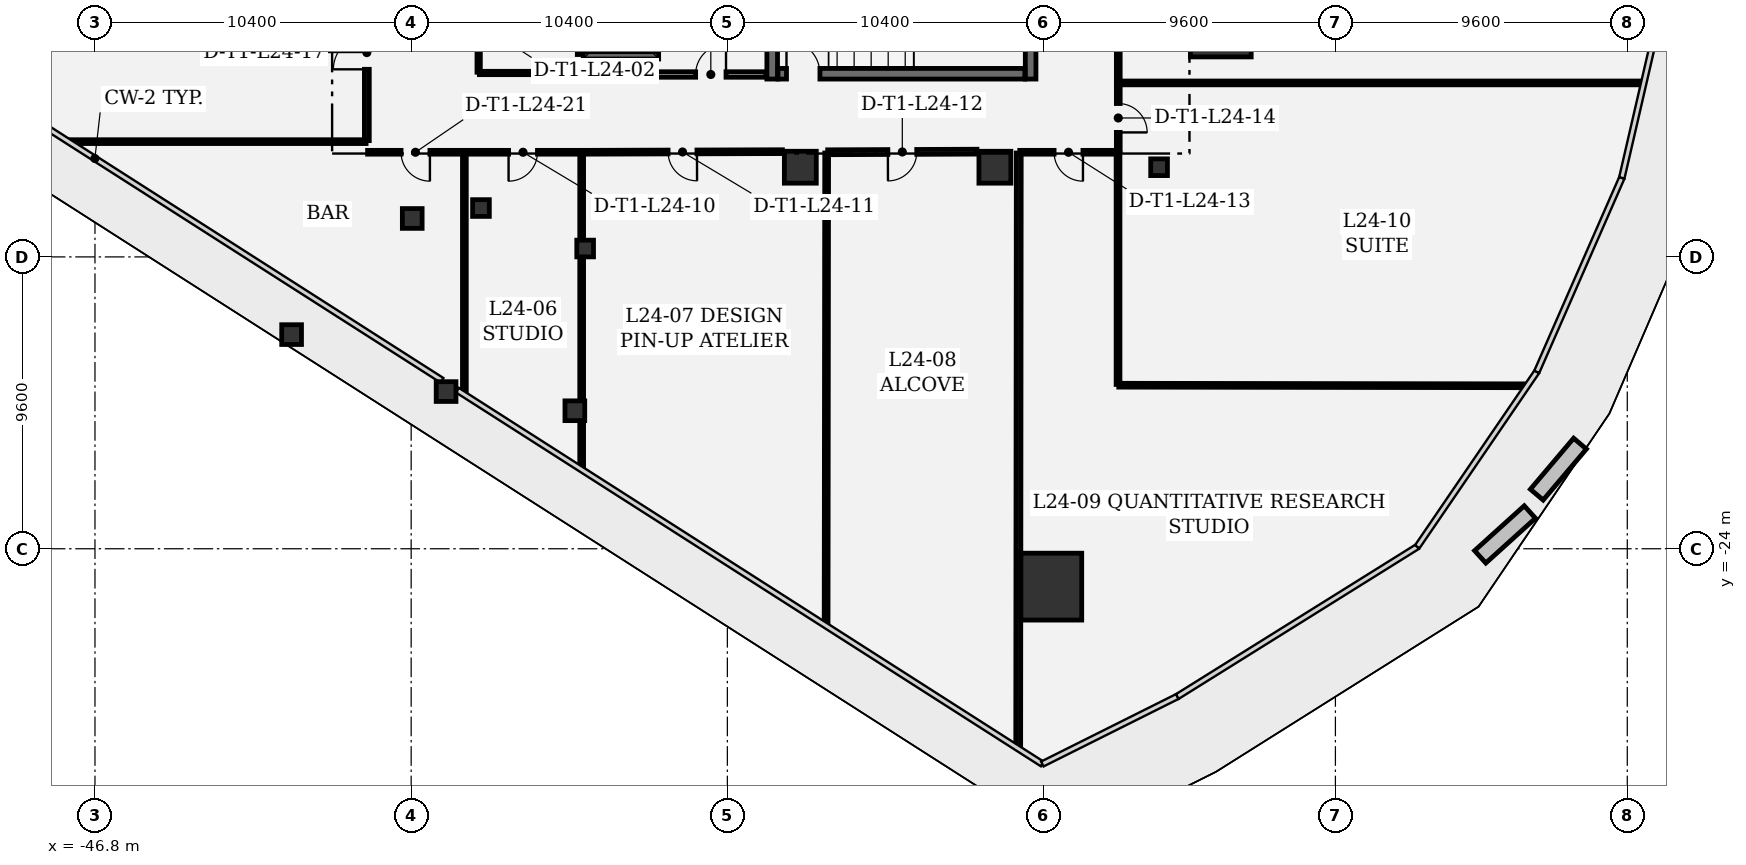
"""IFC4 building model, lengths in metres.
Left out: names, types, materials, properties, quantities, classifications, styles, units other than length and angle.
Written with IfcOpenShell. Run it as: python <this file> out.ifc"""

import sys

from ifc_helpers import new_model, si_unit, direction, frame, frame_2d, origin, origin_2d, place, context, subcontext, project, spatial, rectangle, extrude, element, fill, save


model = new_model("IFC4")
c1 = context("Model", 3, precision=1e-05, world=origin(), true_north=direction((0.0, 1.0)))
c2 = subcontext(c1, "Body", "Model", "MODEL_VIEW")
j1 = project(units=[si_unit("LENGTHUNIT", "METRE"), si_unit("PLANEANGLEUNIT", "RADIAN")], contexts=[c1])
p1 = place(None, origin())
s1 = spatial("IfcSite", under=j1, at=p1, CompositionType="ELEMENT")
p2 = place(p1, origin())
s2 = spatial("IfcBuilding", under=s1, at=p2, CompositionType="ELEMENT")
p3 = place(p2, frame((0.0, 0.0, 109.8)))
s3 = spatial("IfcBuildingStorey", under=s2, at=p3, CompositionType="ELEMENT", Elevation=109.8)
for number, where, z_axis, x_axis in (
    (1, (-15.344, -25.246, 0.0), (0.0, 0.0, 1.0), (1.0, 0.0, 0.0)),
    (2, (-9.77, -6.721, 0.0), (0.0, 0.0, 1.0), (1.0, 0.0, 0.0)),
):
    element("IfcColumn", number, at=place(p3, frame(where, z_axis=z_axis, x_axis=x_axis)), inside=s3, PredefinedType="COLUMN", context=c2, shape_type="SweptSolid", body=[
        extrude(rectangle(XDim=2.0, YDim=2.2, at=origin_2d()), origin(), (0.0, 0.0, 1.0), 4.05),
    ])
for number, where, z_axis, x_axis in (
    (3, (-17.2, -11.45, 0.0), (0.0, 0.0, 1.0), (1.0, 0.0, 0.0)),
    (4, (-23.6, -11.45, 0.0), (0.0, 0.0, 1.0), (1.0, 0.0, 0.0)),
):
    element("IfcColumn", number, at=place(p3, frame(where, z_axis=z_axis, x_axis=x_axis)), inside=s3, PredefinedType="COLUMN", context=c2, shape_type="SweptSolid", body=[
        extrude(rectangle(XDim=1.05, YDim=1.05, at=origin_2d()), origin(), (0.0, 0.0, 1.0), 4.05),
    ])
for number, where, z_axis, x_axis in (
    (5, (-40.333, -16.956, 0.0), (0.0, 0.0, 1.0), (1.0, 0.0, 0.0)),
    (6, (-35.252, -18.829, 0.0), (0.0, 0.0, 1.0), (1.0, 0.0, 0.0)),
    (7, (-31.016, -19.46, 0.0), (0.0, 0.0, 1.0), (1.0, 0.0, 0.0)),
    (8, (-36.365, -13.135, 0.0), (0.0, 0.0, 1.0), (1.0, 0.0, 0.0)),
):
    element("IfcColumn", number, at=place(p3, frame(where, z_axis=z_axis, x_axis=x_axis)), inside=s3, PredefinedType="COLUMN", context=c2, shape_type="SweptSolid", body=[
        extrude(rectangle(XDim=0.65, YDim=0.65, at=origin_2d()), origin(), (0.0, 0.0, 1.0), 4.05),
    ])
for number, where, z_axis, x_axis in (
    (9, (-34.104, -12.792, 0.0), (0.0, 0.0, 1.0), (1.0, 0.0, 0.0)),
    (10, (-30.677, -14.124, 0.0), (0.0, 0.0, 1.0), (1.0, 0.0, 0.0)),
    (11, (-11.8, -11.45, 0.0), (0.0, 0.0, 1.0), (1.0, 0.0, 0.0)),
):
    element("IfcColumn", number, at=place(p3, frame(where, z_axis=z_axis, x_axis=x_axis)), inside=s3, PredefinedType="COLUMN", context=c2, shape_type="SweptSolid", body=[
        extrude(rectangle(XDim=0.55, YDim=0.55, at=origin_2d()), origin(), (0.0, 0.0, 1.0), 4.05),
    ])
p4 = place(p3, frame((-24.525, -4.34, 0.0), z_axis=(0.0, 0.0, 1.0), x_axis=(0.0, -1.0, 0.0)))
e12 = element("IfcWall", 12, at=p4, inside=s3, PredefinedType="SHEAR", context=c2, shape_type="SweptSolid", body=[
    extrude(rectangle(XDim=4.21, YDim=0.35, at=frame_2d((2.105, 0.0))), origin(), (0.0, 0.0, 1.0), 3.77),
])
p5 = place(p3, frame((-16.025, -8.55, 0.0), z_axis=(0.0, 0.0, 1.0), x_axis=(0.0, 1.0, 0.0)))
e13 = element("IfcWall", 13, at=p5, inside=s3, PredefinedType="SHEAR", context=c2, shape_type="SweptSolid", body=[
    extrude(rectangle(XDim=4.61, YDim=0.35, at=frame_2d((2.305, 0.0))), origin(), (0.0, 0.0, 1.0), 3.77),
])
p6 = place(p3, frame((-24.335, -8.375, 0.0), z_axis=(0.0, 0.0, 1.0), x_axis=(1.0, 0.0, 0.0)))
e14 = element("IfcWall", 14, at=p6, inside=s3, PredefinedType="SHEAR", context=c2, shape_type="SweptSolid", body=[
    extrude(rectangle(XDim=8.12, YDim=0.35, at=frame_2d((4.06, 0.0))), origin(), (0.0, 0.0, 1.0), 3.77),
])
p7 = place(p6, frame((0.28, 0.0, 0.0)))
e15 = element("IfcOpeningElement", 15, at=p7, cuts=e14, PredefinedType="OPENING", context=c2, shape_type="SweptSolid", body=[
    extrude(rectangle(XDim=1.1, YDim=2.2, at=frame_2d((0.55, 1.1))), frame((0.0, 0.185, 0.0), z_axis=(0.0, -1.0, 0.0), x_axis=(1.0, 0.0, 0.0)), (0.0, 0.0, 1.0), 0.37),
])
p8 = place(p3, frame((-28.26, -7.77, 0.0), z_axis=(0.0, 0.0, 1.0), x_axis=(-1.0, 0.0, 0.0)))
e16 = element("IfcWall", 16, at=p8, inside=s3, PredefinedType="SHEAR", context=c2, shape_type="SweptSolid", body=[
    extrude(rectangle(XDim=2.48, YDim=0.24, at=frame_2d((1.24, 0.0))), origin(), (0.0, 0.0, 1.0), 3.77),
])
p9 = place(p3, frame((-28.355, -8.4, 0.0), z_axis=(0.0, 0.0, 1.0), x_axis=(1.0, 0.0, 0.0)))
e17 = element("IfcWall", 17, at=p9, inside=s3, PredefinedType="PARTITIONING", context=c2, shape_type="SweptSolid", body=[
    extrude(rectangle(XDim=3.622, YDim=0.18, at=frame_2d((1.811, 0.0))), origin(), (0.0, 0.0, 1.0), 3.77),
])
p10 = place(p9, frame((1.311, 0.0, 0.0)))
e18 = element("IfcOpeningElement", 18, at=p10, cuts=e17, PredefinedType="OPENING", context=c2, shape_type="SweptSolid", body=[
    extrude(rectangle(XDim=1.0, YDim=2.15, at=frame_2d((0.5, 1.075))), frame((0.0, 0.1, 0.0), z_axis=(0.0, -1.0, 0.0), x_axis=(1.0, 0.0, 0.0)), (0.0, 0.0, 1.0), 0.2),
])
p11 = place(p3, frame((-34.155, -8.35, 0.0), z_axis=(0.0, 0.0, 1.0), x_axis=(1.0, 0.0, 0.0)))
e19 = element("IfcWall", 19, at=p11, inside=s3, PredefinedType="PARTITIONING", context=c2, shape_type="SweptSolid", body=[
    extrude(rectangle(XDim=3.25, YDim=0.11, at=frame_2d((1.625, 0.0))), origin(), (0.0, 0.0, 1.0), 3.77),
])
p12 = place(p3, frame((-30.88, -7.743, 0.0), z_axis=(0.0, 0.0, 1.0), x_axis=(0.0, 1.0, 0.0)))
e20 = element("IfcWall", 20, at=p12, inside=s3, PredefinedType="PARTITIONING", context=c2, shape_type="SweptSolid", body=[
    extrude(rectangle(XDim=2.003, YDim=0.11, at=frame_2d((1.001, 0.0))), origin(), (0.0, 0.0, 1.0), 3.77),
])
p13 = place(p3, frame((-34.18, -5.075, 0.0), z_axis=(0.0, 0.0, 1.0), x_axis=(0.0, -1.0, 0.0)))
e21 = element("IfcWall", 21, at=p13, inside=s3, PredefinedType="PARTITIONING", context=c2, shape_type="SweptSolid", body=[
    extrude(rectangle(XDim=3.25, YDim=0.11, at=frame_2d((1.625, 0.0))), origin(), (0.0, 0.0, 1.0), 3.77),
])
p14 = place(p13, frame((1.185, 0.0, 0.0)))
e22 = element("IfcOpeningElement", 22, at=p14, cuts=e21, PredefinedType="OPENING", context=c2, shape_type="SweptSolid", body=[
    extrude(rectangle(XDim=0.88, YDim=2.1, at=frame_2d((0.44, 1.05))), frame((0.0, 0.065, 0.0), z_axis=(0.0, -1.0, 0.0), x_axis=(1.0, 0.0, 0.0)), (0.0, 0.0, 1.0), 0.13),
])
p15 = place(p3, frame((-30.817, -10.958, 0.0), z_axis=(0.0, 0.0, 1.0), x_axis=(-1.0, 0.0, 0.0)))
e23 = element("IfcWall", 23, at=p15, inside=s3, PredefinedType="PARTITIONING", context=c2, shape_type="SweptSolid", body=[
    extrude(rectangle(XDim=3.808, YDim=0.125, at=frame_2d((1.904, 0.0))), origin(), (0.0, 0.0, 1.0), 3.77),
])
p16 = place(p15, frame((1.429, 0.0, 0.0)))
e24 = element("IfcOpeningElement", 24, at=p16, cuts=e23, PredefinedType="OPENING", context=c2, shape_type="SweptSolid", body=[
    extrude(rectangle(XDim=0.95, YDim=2.15, at=frame_2d((0.475, 1.075))), frame((0.0, 0.073, 0.0), z_axis=(0.0, -1.0, 0.0), x_axis=(1.0, 0.0, 0.0)), (0.0, 0.0, 1.0), 0.145),
])
p17 = place(p3, frame((-34.65, -10.983, 0.0), z_axis=(0.0, 0.0, 1.0), x_axis=(0.0, -1.0, 0.0)))
e25 = element("IfcWall", 25, at=p17, inside=s3, PredefinedType="PARTITIONING", context=c2, shape_type="SweptSolid", body=[
    extrude(rectangle(XDim=7.868, YDim=0.125, at=frame_2d((3.934, 0.0))), origin(), (0.0, 0.0, 1.0), 3.77),
])
p18 = place(p3, frame((-30.792, -21.316, 0.0), z_axis=(0.0, 0.0, 1.0), x_axis=(0.0, 1.0, 0.0)))
e26 = element("IfcWall", 26, at=p18, inside=s3, PredefinedType="PARTITIONING", context=c2, shape_type="SweptSolid", body=[
    extrude(rectangle(XDim=1.466, YDim=0.125, at=frame_2d((0.733, 0.0))), origin(), (0.0, 0.0, 1.0), 3.77),
])
p19 = place(p3, frame((-30.792, -19.07, 0.0), z_axis=(0.0, 0.0, 1.0), x_axis=(0.0, 1.0, 0.0)))
e27 = element("IfcWall", 27, at=p19, inside=s3, PredefinedType="PARTITIONING", context=c2, shape_type="SweptSolid", body=[
    extrude(rectangle(XDim=4.606, YDim=0.125, at=frame_2d((2.303, 0.0))), origin(), (0.0, 0.0, 1.0), 3.77),
])
p20 = place(p3, frame((-30.792, -13.784, 0.0), z_axis=(0.0, 0.0, 1.0), x_axis=(0.0, 1.0, 0.0)))
e28 = element("IfcWall", 28, at=p20, inside=s3, PredefinedType="PARTITIONING", context=c2, shape_type="SweptSolid", body=[
    extrude(rectangle(XDim=2.801, YDim=0.125, at=frame_2d((1.401, 0.0))), origin(), (0.0, 0.0, 1.0), 3.77),
])
p21 = place(p3, frame((-24.19, -10.938, 0.0), z_axis=(0.0, 0.0, 1.0), x_axis=(-0.999995468533, -0.003010467292, 0.0)))
e29 = element("IfcWall", 29, at=p21, inside=s3, PredefinedType="PARTITIONING", context=c2, shape_type="SweptSolid", body=[
    extrude(rectangle(XDim=6.569, YDim=0.125, at=frame_2d((3.284, 0.0))), origin(), (0.0, 0.0, 1.0), 3.77),
])
p22 = place(p21, frame((2.81, 0.0, 0.0)))
e30 = element("IfcOpeningElement", 30, at=p22, cuts=e29, PredefinedType="OPENING", context=c2, shape_type="SweptSolid", body=[
    extrude(rectangle(XDim=0.95, YDim=2.15, at=frame_2d((0.475, 1.075))), frame((0.0, 0.073, 0.0), z_axis=(0.0, -1.0, 0.0), x_axis=(1.0, 0.0, 0.0)), (0.0, 0.0, 1.0), 0.145),
])
p23 = place(p3, frame((-22.752, -26.455, 0.0), z_axis=(0.0, 0.0, 1.0), x_axis=(0.001167688914, 0.999999318251, 0.0)))
e31 = element("IfcWall", 31, at=p23, inside=s3, PredefinedType="PARTITIONING", context=c2, shape_type="SweptSolid", body=[
    extrude(rectangle(XDim=15.472, YDim=0.125, at=frame_2d((7.736, 0.0))), origin(), (0.0, 0.0, 1.0), 2.885),
])
p24 = place(p3, frame((-17.79, -10.938, 0.0), z_axis=(0.0, 0.0, 1.0), x_axis=(-0.99999189155, -0.004027013186, 0.0)))
e32 = element("IfcWall", 32, at=p24, inside=s3, PredefinedType="PARTITIONING", context=c2, shape_type="SweptSolid", body=[
    extrude(rectangle(XDim=4.911, YDim=0.16, at=frame_2d((2.455, 0.0))), origin(), (0.0, 0.0, 1.0), 3.77),
])
p25 = place(p24, frame((1.98, 0.0, 0.0)))
e33 = element("IfcOpeningElement", 33, at=p25, cuts=e32, PredefinedType="OPENING", context=c2, shape_type="SweptSolid", body=[
    extrude(rectangle(XDim=0.95, YDim=2.15, at=frame_2d((0.475, 1.075))), frame((0.0, 0.09, 0.0), z_axis=(0.0, -1.0, 0.0), x_axis=(1.0, 0.0, 0.0)), (0.0, 0.0, 1.0), 0.18),
])
p26 = place(p3, frame((-16.433, -30.493, 0.0), z_axis=(0.0, 0.0, 1.0), x_axis=(0.000925983461, 0.999999571277, 0.0)))
e34 = element("IfcWall", 34, at=p26, inside=s3, PredefinedType="PARTITIONING", context=c2, shape_type="SweptSolid", body=[
    extrude(rectangle(XDim=19.51, YDim=0.16, at=frame_2d((9.755, 0.0))), origin(), (0.0, 0.0, 1.0), 2.885),
])
p27 = place(p3, frame((0.229, -18.639, 0.0), z_axis=(0.0, 0.0, 1.0), x_axis=(-0.999999034754, 0.001389420769, 0.0)))
e35 = element("IfcWall", 35, at=p27, inside=s3, PredefinedType="PARTITIONING", context=c2, shape_type="SweptSolid", body=[
    extrude(rectangle(XDim=13.354, YDim=0.125, at=frame_2d((6.677, 0.0))), origin(), (0.0, 0.0, 1.0), 3.77),
])
p28 = place(p3, frame((-13.15, -10.983, 0.0), z_axis=(0.0, 0.0, 1.0), x_axis=(0.0, -1.0, 0.0)))
e36 = element("IfcWall", 36, at=p28, inside=s3, PredefinedType="PARTITIONING", context=c2, shape_type="SweptSolid", body=[
    extrude(rectangle(XDim=7.613, YDim=0.125, at=frame_2d((3.806, 0.0))), origin(), (0.0, 0.0, 1.0), 2.89),
])
p29 = place(p3, frame((-13.175, -10.958, 0.0), z_axis=(0.0, 0.0, 1.0), x_axis=(-1.0, 0.0, 0.0)))
e37 = element("IfcWall", 37, at=p29, inside=s3, PredefinedType="PARTITIONING", context=c2, shape_type="SweptSolid", body=[
    extrude(rectangle(XDim=3.207, YDim=0.125, at=frame_2d((1.604, 0.0))), origin(), (0.0, 0.0, 1.0), 2.885),
])
p30 = place(p29, frame((1.129, 0.0, 0.0)))
e38 = element("IfcOpeningElement", 38, at=p30, cuts=e37, PredefinedType="OPENING", context=c2, shape_type="SweptSolid", body=[
    extrude(rectangle(XDim=0.95, YDim=2.15, at=frame_2d((0.475, 1.075))), frame((0.0, 0.073, 0.0), z_axis=(0.0, -1.0, 0.0), x_axis=(1.0, 0.0, 0.0)), (0.0, 0.0, 1.0), 0.145),
])
p31 = place(p3, frame((4.062, -8.677, 0.0), z_axis=(0.0, 0.0, 1.0), x_axis=(-1.0, 0.0, 0.0)))
e39 = element("IfcWall", 39, at=p31, inside=s3, PredefinedType="PARTITIONING", context=c2, shape_type="SweptSolid", body=[
    extrude(rectangle(XDim=17.179, YDim=0.125, at=frame_2d((8.59, 0.0))), origin(), (0.0, 0.0, 1.0), 2.885),
])
p32 = place(p3, frame((-13.142, -8.702, 0.0), z_axis=(0.0, 0.0, 1.0), x_axis=(0.0, -1.0, 0.0)))
e40 = element("IfcWall", 40, at=p32, inside=s3, PredefinedType="PARTITIONING", context=c2, shape_type="SweptSolid", body=[
    extrude(rectangle(XDim=2.256, YDim=0.125, at=frame_2d((1.128, 0.0))), origin(), (0.0, 0.0, 1.0), 3.77),
])
p33 = place(p32, frame((0.653, 0.0, 0.0)))
e41 = element("IfcOpeningElement", 41, at=p33, cuts=e40, PredefinedType="OPENING", context=c2, shape_type="SweptSolid", body=[
    extrude(rectangle(XDim=0.95, YDim=2.15, at=frame_2d((0.475, 1.075))), frame((0.0, 0.073, 0.0), z_axis=(0.0, -1.0, 0.0), x_axis=(1.0, 0.0, 0.0)), (0.0, 0.0, 1.0), 0.145),
])
p34 = place(p3, frame((-13.142, 2.878, 0.0), z_axis=(0.0, 0.0, 1.0), x_axis=(0.0, -1.0, 0.0)))
e42 = element("IfcWall", 42, at=p34, inside=s3, PredefinedType="PARTITIONING", context=c2, shape_type="SweptSolid", body=[
    extrude(rectangle(XDim=11.523, YDim=0.125, at=frame_2d((5.761, 0.0))), origin(), (0.0, 0.0, 1.0), 3.77),
])
p35 = place(p34, frame((5.286, 0.0, 0.0)))
e43 = element("IfcOpeningElement", 43, at=p35, cuts=e42, PredefinedType="OPENING", context=c2, shape_type="SweptSolid", body=[
    extrude(rectangle(XDim=0.95, YDim=2.15, at=frame_2d((0.475, 1.075))), frame((0.0, 0.073, 0.0), z_axis=(0.0, -1.0, 0.0), x_axis=(1.0, 0.0, 0.0)), (0.0, 0.0, 1.0), 0.145),
])
p36 = place(p3, frame((-34.683, -10.958, 0.0), z_axis=(0.0, 0.0, 1.0), x_axis=(-1.0, 0.0, 0.0)))
e44 = element("IfcWall", 44, at=p36, inside=s3, PredefinedType="PARTITIONING", context=c2, shape_type="SweptSolid", body=[
    extrude(rectangle(XDim=3.15, YDim=0.125, at=frame_2d((1.575, 0.0))), origin(), (0.0, 0.0, 1.0), 3.334),
])
p37 = place(p36, frame((1.1, 0.0, 0.0)))
e45 = element("IfcOpeningElement", 45, at=p37, cuts=e44, PredefinedType="OPENING", context=c2, shape_type="SweptSolid", body=[
    extrude(rectangle(XDim=0.95, YDim=2.15, at=frame_2d((0.475, 1.075))), frame((0.0, 0.073, 0.0), z_axis=(0.0, -1.0, 0.0), x_axis=(1.0, 0.0, 0.0)), (0.0, 0.0, 1.0), 0.145),
])
p38 = place(p3, frame((-37.883, -10.608, 0.0), z_axis=(0.0, 0.0, 1.0), x_axis=(-1.0, 0.0, 0.0)))
e46 = element("IfcWall", 46, at=p38, inside=s3, PredefinedType="PARTITIONING", context=c2, shape_type="SweptSolid", body=[
    extrude(rectangle(XDim=9.708, YDim=0.125, at=frame_2d((4.854, 0.0))), origin(), (0.0, 0.0, 1.0), 2.89),
])
p39 = place(p3, frame((-37.858, -10.576, 0.0), z_axis=(0.0, 0.0, 1.0), x_axis=(0.0, 1.0, 0.0)))
e47 = element("IfcWall", 47, at=p39, inside=s3, PredefinedType="PARTITIONING", context=c2, shape_type="SweptSolid", body=[
    extrude(rectangle(XDim=5.792, YDim=0.16, at=frame_2d((2.896, 0.0))), origin(), (0.0, 0.0, 1.0), 3.77),
])
p40 = place(p39, frame((2.346, 0.0, 0.0)))
e48 = element("IfcOpeningElement", 48, at=p40, cuts=e47, PredefinedType="OPENING", context=c2, shape_type="SweptSolid", body=[
    extrude(rectangle(XDim=1.1, YDim=2.15, at=frame_2d((0.55, 1.075))), frame((0.0, 0.09, 0.0), z_axis=(0.0, -1.0, 0.0), x_axis=(1.0, 0.0, 0.0)), (0.0, 0.0, 1.0), 0.18),
])
p41 = place(p7, origin())
e49 = element("IfcDoor", 49, at=p41, inside=s3, OperationType="SINGLE_SWING_LEFT", PredefinedType="DOOR", context=c2, shape_type="SweptSolid", body=[
    extrude(rectangle(XDim=1.1, YDim=2.2, at=frame_2d((0.55, 1.1))), frame((0.0, 0.025, 0.0), z_axis=(0.0, -1.0, 0.0), x_axis=(1.0, 0.0, 0.0)), (0.0, 0.0, 1.0), 0.05),
])
fill(e15, e49)
p42 = place(p16, origin())
e50 = element("IfcDoor", 50, at=p42, inside=s3, OperationType="SINGLE_SWING_RIGHT", PredefinedType="DOOR", context=c2, shape_type="SweptSolid", body=[
    extrude(rectangle(XDim=0.95, YDim=2.15, at=frame_2d((0.475, 1.075))), frame((0.0, 0.025, 0.0), z_axis=(0.0, -1.0, 0.0), x_axis=(1.0, 0.0, 0.0)), (0.0, 0.0, 1.0), 0.05),
])
fill(e24, e50)
p43 = place(p22, origin())
e51 = element("IfcDoor", 51, at=p43, inside=s3, OperationType="SINGLE_SWING_LEFT", PredefinedType="DOOR", context=c2, shape_type="SweptSolid", body=[
    extrude(rectangle(XDim=0.95, YDim=2.15, at=frame_2d((0.475, 1.075))), frame((0.0, 0.025, 0.0), z_axis=(0.0, -1.0, 0.0), x_axis=(1.0, 0.0, 0.0)), (0.0, 0.0, 1.0), 0.05),
])
fill(e30, e51)
p44 = place(p25, origin())
e52 = element("IfcDoor", 52, at=p44, inside=s3, OperationType="SINGLE_SWING_RIGHT", PredefinedType="DOOR", context=c2, shape_type="SweptSolid", body=[
    extrude(rectangle(XDim=0.95, YDim=2.15, at=frame_2d((0.475, 1.075))), frame((0.0, 0.025, 0.0), z_axis=(0.0, -1.0, 0.0), x_axis=(1.0, 0.0, 0.0)), (0.0, 0.0, 1.0), 0.05),
])
fill(e33, e52)
p45 = place(p30, origin())
e53 = element("IfcDoor", 53, at=p45, inside=s3, OperationType="SINGLE_SWING_LEFT", PredefinedType="DOOR", context=c2, shape_type="SweptSolid", body=[
    extrude(rectangle(XDim=0.95, YDim=2.15, at=frame_2d((0.475, 1.075))), frame((0.0, 0.025, 0.0), z_axis=(0.0, -1.0, 0.0), x_axis=(1.0, 0.0, 0.0)), (0.0, 0.0, 1.0), 0.05),
])
fill(e38, e53)
p46 = place(p33, origin())
e54 = element("IfcDoor", 54, at=p46, inside=s3, OperationType="SINGLE_SWING_RIGHT", PredefinedType="DOOR", context=c2, shape_type="SweptSolid", body=[
    extrude(rectangle(XDim=0.95, YDim=2.15, at=frame_2d((0.475, 1.075))), frame((0.0, 0.025, 0.0), z_axis=(0.0, -1.0, 0.0), x_axis=(1.0, 0.0, 0.0)), (0.0, 0.0, 1.0), 0.05),
])
fill(e41, e54)
p47 = place(p40, origin())
e55 = element("IfcDoor", 55, at=p47, inside=s3, OperationType="SINGLE_SWING_LEFT", PredefinedType="DOOR", context=c2, shape_type="SweptSolid", body=[
    extrude(rectangle(XDim=1.1, YDim=2.15, at=frame_2d((0.55, 1.075))), frame((0.0, 0.025, 0.0), z_axis=(0.0, -1.0, 0.0), x_axis=(1.0, 0.0, 0.0)), (0.0, 0.0, 1.0), 0.05),
])
fill(e48, e55)
p48 = place(p10, origin())
e56 = element("IfcDoor", 56, at=p48, inside=s3, OperationType="SINGLE_SWING_RIGHT", PredefinedType="DOOR", context=c2, shape_type="SweptSolid", body=[
    extrude(rectangle(XDim=1.0, YDim=2.15, at=frame_2d((0.5, 1.075))), frame((0.0, 0.025, 0.0), z_axis=(0.0, -1.0, 0.0), x_axis=(1.0, 0.0, 0.0)), (0.0, 0.0, 1.0), 0.05),
])
fill(e18, e56)
p49 = place(p37, origin())
e57 = element("IfcDoor", 57, at=p49, inside=s3, OperationType="SINGLE_SWING_LEFT", PredefinedType="DOOR", context=c2, shape_type="SweptSolid", body=[
    extrude(rectangle(XDim=0.95, YDim=2.15, at=frame_2d((0.475, 1.075))), frame((0.0, 0.025, 0.0), z_axis=(0.0, -1.0, 0.0), x_axis=(1.0, 0.0, 0.0)), (0.0, 0.0, 1.0), 0.05),
])
fill(e45, e57)
save(model, sys.argv[1])
